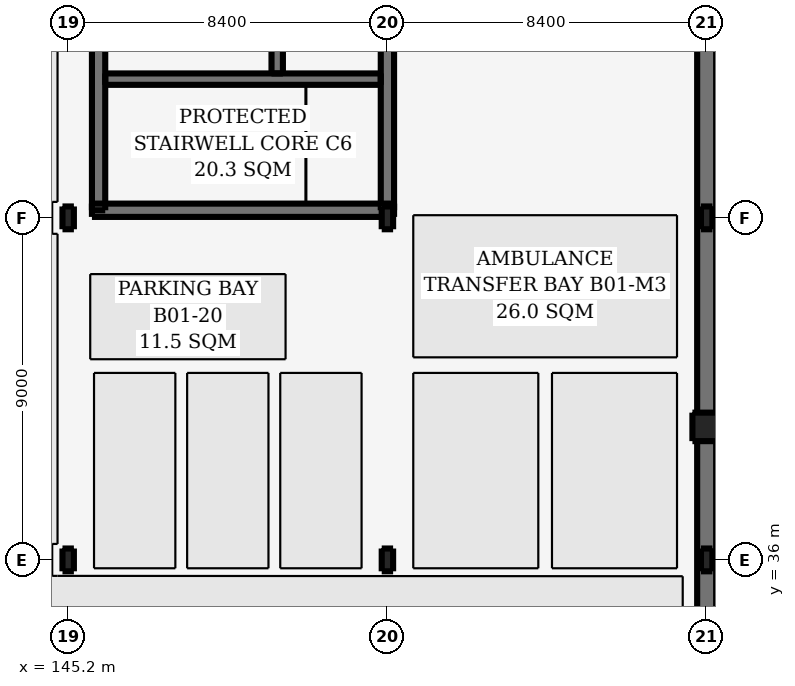
"""IFC4 building model, lengths in metres.
Left out: names, types, materials, properties, quantities, classifications, styles, units other than length and angle.
Written with IfcOpenShell. Run it as: python <this file> out.ifc"""

import sys

from ifc_helpers import new_model, si_unit, direction, frame, frame_2d, origin, origin_2d, place, context, subcontext, project, spatial, rectangle, i_section, extrude, element, fill, save


model = new_model("IFC4")
c1 = context("Model", 3, precision=1e-05, world=origin(), true_north=direction((0.0, 1.0)))
c2 = subcontext(c1, "Body", "Model", "MODEL_VIEW")
j1 = project(units=[si_unit("LENGTHUNIT", "METRE"), si_unit("PLANEANGLEUNIT", "RADIAN")], contexts=[c1])
p1 = place(None, origin())
s1 = spatial("IfcSite", under=j1, at=p1, CompositionType="ELEMENT")
p2 = place(p1, origin())
s2 = spatial("IfcBuilding", under=s1, at=p2, CompositionType="ELEMENT")
p3 = place(p2, frame((0.0, 0.0, -4.8)))
s3 = spatial("IfcBuildingStorey", under=s2, at=p3, CompositionType="ELEMENT", Elevation=-4.8)
for number, where, z_axis, x_axis in (
    (1, (145.2, 36.0, 0.0), (0.0, 0.0, 1.0), (1.0, 0.0, 0.0)),
    (2, (145.2, 45.0, 0.0), (0.0, 0.0, 1.0), (1.0, 0.0, 0.0)),
    (3, (153.6, 36.0, 0.0), (0.0, 0.0, 1.0), (1.0, 0.0, 0.0)),
    (4, (153.6, 45.0, 0.0), (0.0, 0.0, 1.0), (1.0, 0.0, 0.0)),
    (5, (162.0, 36.0, 0.0), (0.0, 0.0, 1.0), (1.0, 0.0, 0.0)),
):
    element("IfcColumn", number, at=place(p3, frame(where, z_axis=z_axis, x_axis=x_axis)), inside=s3, PredefinedType="COLUMN", context=c2, shape_type="SweptSolid", body=[
        extrude(i_section(OverallWidth=0.3, OverallDepth=0.6, WebThickness=0.015, FlangeThickness=0.03, FilletRadius=0.027, at=origin_2d()), origin(), (0.0, 0.0, 1.0), 4.8),
    ])
p4 = place(p3, frame((162.0, 39.5, 0.0), z_axis=(0.0, 0.0, 1.0), x_axis=(1.0, 0.0, 0.0)))
e6 = element("IfcColumn", 6, at=p4, inside=s3, PredefinedType="PILASTER", context=c2, shape_type="SweptSolid", body=[
    extrude(rectangle(XDim=0.75, YDim=0.75, at=origin_2d()), origin(), (0.0, 0.0, 1.0), 4.8),
])
p5 = place(p3, frame((162.0, 45.0, 0.0), z_axis=(0.0, 0.0, 1.0), x_axis=(1.0, 0.0, 0.0)))
e7 = element("IfcColumn", 7, at=p5, inside=s3, PredefinedType="COLUMN", context=c2, shape_type="SweptSolid", body=[
    extrude(i_section(OverallWidth=0.3, OverallDepth=0.6, WebThickness=0.015, FlangeThickness=0.03, FilletRadius=0.027, at=origin_2d()), origin(), (0.0, 0.0, 1.0), 4.8),
])
p6 = place(p3, frame((162.0, 52.2, 0.0), z_axis=(0.0, 0.0, 1.0), x_axis=(0.0, -1.0, 0.0)))
e8 = element("IfcWall", 8, at=p6, inside=s3, PredefinedType="SOLIDWALL", context=c2, shape_type="SweptSolid", body=[
    extrude(rectangle(XDim=34.2, YDim=0.5, at=frame_2d((17.1, 0.0))), origin(), (0.0, 0.0, 1.0), 4.5),
])
p7 = place(p3, frame((145.825, 45.2, 0.0), z_axis=(0.0, 0.0, 1.0), x_axis=(1.0, 0.0, 0.0)))
e9 = element("IfcWall", 9, at=p7, inside=s3, PredefinedType="SHEAR", context=c2, shape_type="SweptSolid", body=[
    extrude(rectangle(XDim=7.95, YDim=0.35, at=frame_2d((3.975, 0.0))), origin(), (0.0, 0.0, 1.0), 4.8),
])
p8 = place(p7, frame((0.45, 0.0, 0.0)))
e10 = element("IfcOpeningElement", 10, at=p8, cuts=e9, PredefinedType="OPENING", context=c2, shape_type="SweptSolid", body=[
    extrude(rectangle(XDim=1.3, YDim=2.15, at=frame_2d((0.65, 1.075))), frame((0.0, 0.185, 0.0), z_axis=(0.0, -1.0, 0.0), x_axis=(1.0, 0.0, 0.0)), (0.0, 0.0, 1.0), 0.37),
])
for number, where, z_axis, x_axis in (
    (11, (146.0, 45.2, 0.0), (0.0, 0.0, 1.0), (0.0, 1.0, 0.0)),
    (12, (153.6, 45.2, 0.0), (0.0, 0.0, 1.0), (0.0, 1.0, 0.0)),
):
    element("IfcWall", number, at=place(p3, frame(where, z_axis=z_axis, x_axis=x_axis)), inside=s3, PredefinedType="SHEAR", context=c2, shape_type="SweptSolid", body=[
        extrude(rectangle(XDim=6.8, YDim=0.35, at=frame_2d((3.4, 0.0))), origin(), (0.0, 0.0, 1.0), 4.8),
    ])
p9 = place(p3, frame((146.175, 48.65, 0.0), z_axis=(0.0, 0.0, 1.0), x_axis=(1.0, 0.0, 0.0)))
e13 = element("IfcWall", 13, at=p9, inside=s3, PredefinedType="SHEAR", context=c2, shape_type="SweptSolid", body=[
    extrude(rectangle(XDim=7.25, YDim=0.3, at=frame_2d((3.625, 0.0))), origin(), (0.0, 0.0, 1.0), 4.8),
])
p10 = place(p3, frame((150.7, 48.8, 0.0), z_axis=(0.0, 0.0, 1.0), x_axis=(0.0, 1.0, 0.0)))
e14 = element("IfcWall", 14, at=p10, inside=s3, PredefinedType="SHEAR", context=c2, shape_type="SweptSolid", body=[
    extrude(rectangle(XDim=3.025, YDim=0.3, at=frame_2d((1.512, 0.0))), origin(), (0.0, 0.0, 1.0), 4.8),
])
p11 = place(p10, frame((0.963, 0.0, 0.0)))
e15 = element("IfcOpeningElement", 15, at=p11, cuts=e14, PredefinedType="OPENING", context=c2, shape_type="SweptSolid", body=[
    extrude(rectangle(XDim=1.1, YDim=2.15, at=frame_2d((0.55, 1.075))), frame((0.0, 0.16, 0.0), z_axis=(0.0, -1.0, 0.0), x_axis=(1.0, 0.0, 0.0)), (0.0, 0.0, 1.0), 0.32),
])
p12 = place(p8, frame((1.3, 0.0, 0.0), z_axis=(0.0, 0.0, 1.0), x_axis=(-1.0, 0.0, 0.0)))
e16 = element("IfcDoor", 16, at=p12, inside=s3, OperationType="SINGLE_SWING_RIGHT", PredefinedType="DOOR", context=c2, shape_type="SweptSolid", body=[
    extrude(rectangle(XDim=1.3, YDim=2.15, at=frame_2d((0.65, 1.075))), frame((0.0, 0.025, 0.0), z_axis=(0.0, -1.0, 0.0), x_axis=(1.0, 0.0, 0.0)), (0.0, 0.0, 1.0), 0.05),
])
fill(e10, e16)
save(model, sys.argv[1])
